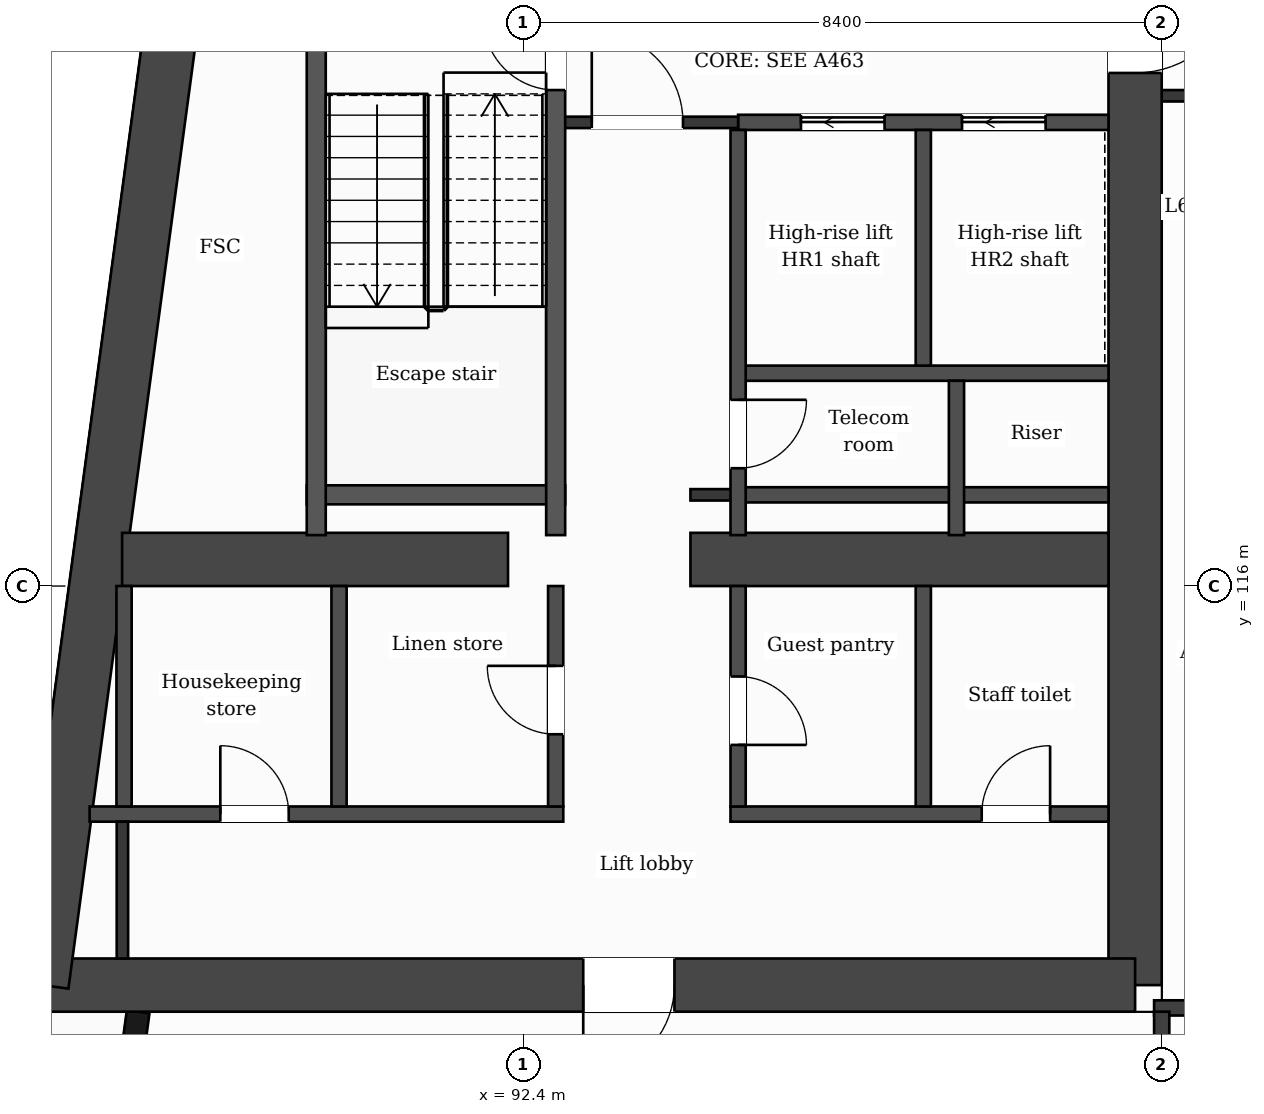
"""IFC4 building model, lengths in metres.
Left out: names, types, materials, properties, quantities, classifications, styles, units other than length and angle.
Written with IfcOpenShell. Run it as: python <this file> out.ifc"""

import sys

from ifc_helpers import new_model, si_unit, direction, frame, frame_2d, origin, place, context, subcontext, project, spatial, rectangle, extrude, element, fill, save


model = new_model("IFC4")
c1 = context("Model", 3, precision=1e-05, world=origin(), true_north=direction((0.0, 1.0)))
c2 = subcontext(c1, "Body", "Model", "MODEL_VIEW")
j1 = project(units=[si_unit("LENGTHUNIT", "METRE"), si_unit("PLANEANGLEUNIT", "RADIAN")], contexts=[c1])
p1 = place(None, origin())
s1 = spatial("IfcSite", under=j1, at=p1, CompositionType="ELEMENT")
p2 = place(p1, origin())
s2 = spatial("IfcBuilding", under=s1, at=p2, CompositionType="ELEMENT")
p3 = place(p2, frame((0.0, 0.0, 259.0)))
s3 = spatial("IfcBuildingStorey", under=s2, at=p3, CompositionType="ELEMENT", Elevation=259.0)
p4 = place(p3, frame((100.45, 132.05, 0.0), z_axis=(0.0, 0.0, 1.0), x_axis=(0.0, -1.0, 0.0)))
e1 = element("IfcWall", 1, at=p4, inside=s3, PredefinedType="SHEAR", context=c2, shape_type="SweptSolid", body=[
    extrude(rectangle(XDim=21.3, YDim=0.7, at=frame_2d((10.65, 0.0))), origin(), (0.0, 0.0, 1.0), 3.7),
])
p5 = place(p4, frame((7.9, 0.0, 0.0)))
e2 = element("IfcOpeningElement", 2, at=p5, cuts=e1, PredefinedType="OPENING", context=c2, shape_type="SweptSolid", body=[
    extrude(rectangle(XDim=1.4, YDim=2.1, at=frame_2d((0.7, 1.05))), frame((0.0, 0.36, 0.0), z_axis=(0.0, -1.0, 0.0), x_axis=(1.0, 0.0, 0.0)), (0.0, 0.0, 1.0), 0.72),
])
p6 = place(p3, frame((100.45, 110.75, 0.0), z_axis=(0.0, 0.0, 1.0), x_axis=(-1.0, 0.0, 0.0)))
e3 = element("IfcWall", 3, at=p6, inside=s3, PredefinedType="SHEAR", context=c2, shape_type="SweptSolid", body=[
    extrude(rectangle(XDim=14.38, YDim=0.7, at=frame_2d((7.19, 0.0))), origin(), (0.0, 0.0, 1.0), 3.7),
])
p7 = place(p6, frame((6.06, 0.0, 0.0)))
e4 = element("IfcOpeningElement", 4, at=p7, cuts=e3, PredefinedType="OPENING", context=c2, shape_type="SweptSolid", body=[
    extrude(rectangle(XDim=1.2, YDim=2.1, at=frame_2d((0.6, 1.05))), frame((0.0, 0.36, 0.0), z_axis=(0.0, -1.0, 0.0), x_axis=(1.0, 0.0, 0.0)), (0.0, 0.0, 1.0), 0.72),
])
p8 = place(p3, frame((86.07, 110.75, 0.0), z_axis=(0.0, 0.0, 1.0), x_axis=(0.133406218907, 0.991061441464, 0.0)))
e5 = element("IfcWall", 5, at=p8, inside=s3, PredefinedType="SHEAR", context=c2, shape_type="SweptSolid", body=[
    extrude(rectangle(XDim=21.492, YDim=0.7, at=frame_2d((10.746, 0.0))), origin(), (0.0, 0.0, 1.0), 3.7),
])
p9 = place(p3, frame((87.123, 116.35, 0.0), z_axis=(0.0, 0.0, 1.0), x_axis=(1.0, 0.0, 0.0)))
e6 = element("IfcWall", 6, at=p9, inside=s3, PredefinedType="SHEAR", context=c2, shape_type="SweptSolid", body=[
    extrude(rectangle(XDim=5.077, YDim=0.7, at=frame_2d((2.539, 0.0))), origin(), (0.0, 0.0, 1.0), 3.7),
])
p10 = place(p3, frame((94.6, 116.35, 0.0), z_axis=(0.0, 0.0, 1.0), x_axis=(1.0, 0.0, 0.0)))
e7 = element("IfcWall", 7, at=p10, inside=s3, PredefinedType="SHEAR", context=c2, shape_type="SweptSolid", body=[
    extrude(rectangle(XDim=5.5, YDim=0.7, at=frame_2d((2.75, 0.0))), origin(), (0.0, 0.0, 1.0), 3.7),
])
p11 = place(p3, frame((87.334, 110.4, 0.0), z_axis=(0.0, 0.0, 1.0), x_axis=(-0.13345962011, -0.991054251694, 0.0)))
e8 = element("IfcWall", 8, at=p11, inside=s3, PredefinedType="SOLIDWALL", context=c2, shape_type="SweptSolid", body=[
    extrude(rectangle(XDim=1.937, YDim=0.3, at=frame_2d((0.969, 0.0))), origin(), (0.0, 0.0, 1.0), 3.38),
])
p12 = place(p3, frame((100.7, 110.45, 0.0), z_axis=(0.0, 0.0, 1.0), x_axis=(1.0, 0.0, 0.0)))
e9 = element("IfcWall", 9, at=p12, inside=s3, PredefinedType="PARTITIONING", context=c2, shape_type="SweptSolid", body=[
    extrude(rectangle(XDim=25.4, YDim=0.2, at=frame_2d((12.7, 0.0))), origin(), (0.0, 0.0, 1.0), 3.38),
])
p13 = place(p3, frame((86.696, 113.0, 0.0), z_axis=(0.0, 0.0, 1.0), x_axis=(1.0, 0.0, 0.0)))
e10 = element("IfcWall", 10, at=p13, inside=s3, PredefinedType="PARTITIONING", context=c2, shape_type="SweptSolid", body=[
    extrude(rectangle(XDim=6.231, YDim=0.2, at=frame_2d((3.116, 0.0))), origin(), (0.0, 0.0, 1.0), 3.38),
])
p14 = place(p13, frame((1.719, 0.0, 0.0)))
e11 = element("IfcOpeningElement", 11, at=p14, cuts=e10, PredefinedType="OPENING", context=c2, shape_type="SweptSolid", body=[
    extrude(rectangle(XDim=0.9, YDim=2.1, at=frame_2d((0.45, 1.05))), frame((0.0, 0.11, 0.0), z_axis=(0.0, -1.0, 0.0), x_axis=(1.0, 0.0, 0.0)), (0.0, 0.0, 1.0), 0.22),
])
p15 = place(p3, frame((95.127, 113.0, 0.0), z_axis=(0.0, 0.0, 1.0), x_axis=(1.0, 0.0, 0.0)))
e12 = element("IfcWall", 12, at=p15, inside=s3, PredefinedType="PARTITIONING", context=c2, shape_type="SweptSolid", body=[
    extrude(rectangle(XDim=4.973, YDim=0.2, at=frame_2d((2.487, 0.0))), origin(), (0.0, 0.0, 1.0), 3.38),
])
p16 = place(p15, frame((3.305, 0.0, 0.0)))
e13 = element("IfcOpeningElement", 13, at=p16, cuts=e12, PredefinedType="OPENING", context=c2, shape_type="SweptSolid", body=[
    extrude(rectangle(XDim=0.9, YDim=2.1, at=frame_2d((0.45, 1.05))), frame((0.0, 0.11, 0.0), z_axis=(0.0, -1.0, 0.0), x_axis=(1.0, 0.0, 0.0)), (0.0, 0.0, 1.0), 0.22),
])
p17 = place(p3, frame((95.227, 117.2, 0.0), z_axis=(0.0, 0.0, 1.0), x_axis=(1.0, 0.0, 0.0)))
e14 = element("IfcWall", 14, at=p17, inside=s3, PredefinedType="PARTITIONING", context=c2, shape_type="SweptSolid", body=[
    extrude(rectangle(XDim=4.873, YDim=0.2, at=frame_2d((2.437, 0.0))), origin(), (0.0, 0.0, 1.0), 3.38),
])
p18 = place(p3, frame((94.6, 117.2, 0.0), z_axis=(0.0, 0.0, 1.0), x_axis=(1.0, 0.0, 0.0)))
e15 = element("IfcWall", 15, at=p18, inside=s3, PredefinedType="PARTITIONING", context=c2, shape_type="SweptSolid", body=[
    extrude(rectangle(XDim=0.627, YDim=0.15, at=frame_2d((0.313, 0.0))), origin(), (0.0, 0.0, 1.0), 3.38),
])
p19 = place(p3, frame((89.552, 117.2, 0.0), z_axis=(0.0, 0.0, 1.0), x_axis=(1.0, 0.0, 0.0)))
e16 = element("IfcWall", 16, at=p19, inside=s3, PredefinedType="PARTITIONING", context=c2, shape_type="SweptSolid", body=[
    extrude(rectangle(XDim=3.4, YDim=0.25, at=frame_2d((1.7, 0.0))), origin(), (0.0, 0.0, 1.0), 3.38),
])
p20 = place(p3, frame((95.227, 118.8, 0.0), z_axis=(0.0, 0.0, 1.0), x_axis=(1.0, 0.0, 0.0)))
e17 = element("IfcWall", 17, at=p20, inside=s3, PredefinedType="PARTITIONING", context=c2, shape_type="SweptSolid", body=[
    extrude(rectangle(XDim=4.873, YDim=0.2, at=frame_2d((2.437, 0.0))), origin(), (0.0, 0.0, 1.0), 3.38),
])
p21 = place(p3, frame((95.227, 122.1, 0.0), z_axis=(0.0, 0.0, 1.0), x_axis=(1.0, 0.0, 0.0)))
e18 = element("IfcWall", 18, at=p21, inside=s3, PredefinedType="PARTITIONING", context=c2, shape_type="SweptSolid", body=[
    extrude(rectangle(XDim=4.873, YDim=0.2, at=frame_2d((2.437, 0.0))), origin(), (0.0, 0.0, 1.0), 3.38),
])
p22 = place(p21, frame((0.827, 0.0, 0.0)))
e19 = element("IfcOpeningElement", 19, at=p22, cuts=e18, PredefinedType="OPENING", context=c2, shape_type="SweptSolid", body=[
    extrude(rectangle(XDim=1.1, YDim=2.1, at=frame_2d((0.55, 1.05))), frame((0.0, 0.11, 0.0), z_axis=(0.0, -1.0, 0.0), x_axis=(1.0, 0.0, 0.0)), (0.0, 0.0, 1.0), 0.22),
])
p23 = place(p21, frame((2.946, 0.0, 0.0)))
e20 = element("IfcOpeningElement", 20, at=p23, cuts=e18, PredefinedType="OPENING", context=c2, shape_type="SweptSolid", body=[
    extrude(rectangle(XDim=1.1, YDim=2.1, at=frame_2d((0.55, 1.05))), frame((0.0, 0.11, 0.0), z_axis=(0.0, -1.0, 0.0), x_axis=(1.0, 0.0, 0.0)), (0.0, 0.0, 1.0), 0.22),
])
p24 = place(p3, frame((92.827, 122.1, 0.0), z_axis=(0.0, 0.0, 1.0), x_axis=(1.0, 0.0, 0.0)))
e21 = element("IfcWall", 21, at=p24, inside=s3, PredefinedType="PARTITIONING", context=c2, shape_type="SweptSolid", body=[
    extrude(rectangle(XDim=2.4, YDim=0.15, at=frame_2d((1.2, 0.0))), origin(), (0.0, 0.0, 1.0), 3.38),
])
p25 = place(p24, frame((0.475, 0.0, 0.0)))
e22 = element("IfcOpeningElement", 22, at=p25, cuts=e21, PredefinedType="OPENING", context=c2, shape_type="SweptSolid", body=[
    extrude(rectangle(XDim=1.2, YDim=2.1, at=frame_2d((0.6, 1.05))), frame((0.0, 0.085, 0.0), z_axis=(0.0, -1.0, 0.0), x_axis=(1.0, 0.0, 0.0)), (0.0, 0.0, 1.0), 0.17),
])
p26 = place(p3, frame((100.8, 122.45, 0.0), z_axis=(0.0, 0.0, 1.0), x_axis=(1.0, 0.0, 0.0)))
e23 = element("IfcWall", 23, at=p26, inside=s3, PredefinedType="PARTITIONING", context=c2, shape_type="SweptSolid", body=[
    extrude(rectangle(XDim=25.2, YDim=0.15, at=frame_2d((12.6, 0.0))), origin(), (0.0, 0.0, 1.0), 3.38),
])
p27 = place(p26, frame((0.63, 0.0, 0.0)))
e24 = element("IfcOpeningElement", 24, at=p27, cuts=e23, PredefinedType="OPENING", context=c2, shape_type="SweptSolid", body=[
    extrude(rectangle(XDim=1.0, YDim=2.1, at=frame_2d((0.5, 1.05))), frame((0.0, 0.085, 0.0), z_axis=(0.0, -1.0, 0.0), x_axis=(1.0, 0.0, 0.0)), (0.0, 0.0, 1.0), 0.17),
])
p28 = place(p26, frame((6.875, 0.0, 0.0)))
e25 = element("IfcOpeningElement", 25, at=p28, cuts=e23, PredefinedType="OPENING", context=c2, shape_type="SweptSolid", body=[
    extrude(rectangle(XDim=0.95, YDim=2.1, at=frame_2d((0.475, 1.05))), frame((0.0, 0.085, 0.0), z_axis=(0.0, -1.0, 0.0), x_axis=(1.0, 0.0, 0.0)), (0.0, 0.0, 1.0), 0.17),
])
p29 = place(p26, frame((8.925, 0.0, 0.0)))
e26 = element("IfcOpeningElement", 26, at=p29, cuts=e23, PredefinedType="OPENING", context=c2, shape_type="SweptSolid", body=[
    extrude(rectangle(XDim=1.0, YDim=2.1, at=frame_2d((0.5, 1.05))), frame((0.0, 0.085, 0.0), z_axis=(0.0, -1.0, 0.0), x_axis=(1.0, 0.0, 0.0)), (0.0, 0.0, 1.0), 0.17),
])
p30 = place(p26, frame((20.5, 0.0, 0.0)))
e27 = element("IfcOpeningElement", 27, at=p30, cuts=e23, PredefinedType="OPENING", context=c2, shape_type="SweptSolid", body=[
    extrude(rectangle(XDim=1.0, YDim=2.1, at=frame_2d((0.5, 1.05))), frame((0.0, 0.085, 0.0), z_axis=(0.0, -1.0, 0.0), x_axis=(1.0, 0.0, 0.0)), (0.0, 0.0, 1.0), 0.17),
])
p31 = place(p3, frame((87.148, 113.1, 0.0), z_axis=(0.0, 0.0, 1.0), x_axis=(0.0, 1.0, 0.0)))
e28 = element("IfcWall", 28, at=p31, inside=s3, PredefinedType="PARTITIONING", context=c2, shape_type="SweptSolid", body=[
    extrude(rectangle(XDim=2.9, YDim=0.2, at=frame_2d((1.45, 0.0))), origin(), (0.0, 0.0, 1.0), 3.38),
])
p32 = place(p3, frame((87.127, 111.1, 0.0), z_axis=(0.0, 0.0, 1.0), x_axis=(0.0, 1.0, 0.0)))
e29 = element("IfcWall", 29, at=p32, inside=s3, PredefinedType="PARTITIONING", context=c2, shape_type="SweptSolid", body=[
    extrude(rectangle(XDim=1.8, YDim=0.15, at=frame_2d((0.9, 0.0))), origin(), (0.0, 0.0, 1.0), 3.38),
])
p33 = place(p3, frame((89.677, 116.67, 0.0), z_axis=(0.0, 0.0, 1.0), x_axis=(0.0, 1.0, 0.0)))
e30 = element("IfcWall", 30, at=p33, inside=s3, PredefinedType="PARTITIONING", context=c2, shape_type="SweptSolid", body=[
    extrude(rectangle(XDim=7.155, YDim=0.25, at=frame_2d((3.578, 0.0))), origin(), (0.0, 0.0, 1.0), 3.38),
])
p34 = place(p3, frame((89.977, 113.1, 0.0), z_axis=(0.0, 0.0, 1.0), x_axis=(0.0, 1.0, 0.0)))
e31 = element("IfcWall", 31, at=p34, inside=s3, PredefinedType="PARTITIONING", context=c2, shape_type="SweptSolid", body=[
    extrude(rectangle(XDim=2.9, YDim=0.2, at=frame_2d((1.45, 0.0))), origin(), (0.0, 0.0, 1.0), 3.38),
])
p35 = place(p3, frame((92.827, 113.1, 0.0), z_axis=(0.0, 0.0, 1.0), x_axis=(0.0, 1.0, 0.0)))
e32 = element("IfcWall", 32, at=p35, inside=s3, PredefinedType="PARTITIONING", context=c2, shape_type="SweptSolid", body=[
    extrude(rectangle(XDim=2.9, YDim=0.2, at=frame_2d((1.45, 0.0))), origin(), (0.0, 0.0, 1.0), 3.38),
])
p36 = place(p35, frame((0.95, 0.0, 0.0)))
e33 = element("IfcOpeningElement", 33, at=p36, cuts=e32, PredefinedType="OPENING", context=c2, shape_type="SweptSolid", body=[
    extrude(rectangle(XDim=0.9, YDim=2.1, at=frame_2d((0.45, 1.05))), frame((0.0, 0.11, 0.0), z_axis=(0.0, -1.0, 0.0), x_axis=(1.0, 0.0, 0.0)), (0.0, 0.0, 1.0), 0.22),
])
p37 = place(p3, frame((92.827, 116.67, 0.0), z_axis=(0.0, 0.0, 1.0), x_axis=(0.0, 1.0, 0.0)))
e34 = element("IfcWall", 34, at=p37, inside=s3, PredefinedType="PARTITIONING", context=c2, shape_type="SweptSolid", body=[
    extrude(rectangle(XDim=7.155, YDim=0.25, at=frame_2d((3.578, 0.0))), origin(), (0.0, 0.0, 1.0), 3.38),
])
p38 = place(p37, frame((5.855, 0.0, 0.0)))
e35 = element("IfcOpeningElement", 35, at=p38, cuts=e34, PredefinedType="OPENING", context=c2, shape_type="SweptSolid", body=[
    extrude(rectangle(XDim=0.95, YDim=2.1, at=frame_2d((0.475, 1.05))), frame((0.0, 0.135, 0.0), z_axis=(0.0, -1.0, 0.0), x_axis=(1.0, 0.0, 0.0)), (0.0, 0.0, 1.0), 0.27),
])
p39 = place(p3, frame((95.227, 113.1, 0.0), z_axis=(0.0, 0.0, 1.0), x_axis=(0.0, 1.0, 0.0)))
e36 = element("IfcWall", 36, at=p39, inside=s3, PredefinedType="PARTITIONING", context=c2, shape_type="SweptSolid", body=[
    extrude(rectangle(XDim=2.9, YDim=0.2, at=frame_2d((1.45, 0.0))), origin(), (0.0, 0.0, 1.0), 3.38),
])
p40 = place(p39, frame((0.81, 0.0, 0.0)))
e37 = element("IfcOpeningElement", 37, at=p40, cuts=e36, PredefinedType="OPENING", context=c2, shape_type="SweptSolid", body=[
    extrude(rectangle(XDim=0.9, YDim=2.1, at=frame_2d((0.45, 1.05))), frame((0.0, 0.11, 0.0), z_axis=(0.0, -1.0, 0.0), x_axis=(1.0, 0.0, 0.0)), (0.0, 0.0, 1.0), 0.22),
])
p41 = place(p3, frame((95.227, 116.67, 0.0), z_axis=(0.0, 0.0, 1.0), x_axis=(0.0, 1.0, 0.0)))
e38 = element("IfcWall", 38, at=p41, inside=s3, PredefinedType="PARTITIONING", context=c2, shape_type="SweptSolid", body=[
    extrude(rectangle(XDim=5.33, YDim=0.2, at=frame_2d((2.665, 0.0))), origin(), (0.0, 0.0, 1.0), 3.38),
])
p42 = place(p41, frame((0.88, 0.0, 0.0)))
e39 = element("IfcOpeningElement", 39, at=p42, cuts=e38, PredefinedType="OPENING", context=c2, shape_type="SweptSolid", body=[
    extrude(rectangle(XDim=0.9, YDim=2.1, at=frame_2d((0.45, 1.05))), frame((0.0, 0.11, 0.0), z_axis=(0.0, -1.0, 0.0), x_axis=(1.0, 0.0, 0.0)), (0.0, 0.0, 1.0), 0.22),
])
p43 = place(p3, frame((97.664, 113.1, 0.0), z_axis=(0.0, 0.0, 1.0), x_axis=(0.0, 1.0, 0.0)))
e40 = element("IfcWall", 40, at=p43, inside=s3, PredefinedType="PARTITIONING", context=c2, shape_type="SweptSolid", body=[
    extrude(rectangle(XDim=2.9, YDim=0.2, at=frame_2d((1.45, 0.0))), origin(), (0.0, 0.0, 1.0), 3.38),
])
p44 = place(p3, frame((97.664, 118.9, 0.0), z_axis=(0.0, 0.0, 1.0), x_axis=(0.0, 1.0, 0.0)))
e41 = element("IfcWall", 41, at=p44, inside=s3, PredefinedType="PARTITIONING", context=c2, shape_type="SweptSolid", body=[
    extrude(rectangle(XDim=3.1, YDim=0.2, at=frame_2d((1.55, 0.0))), origin(), (0.0, 0.0, 1.0), 3.38),
])
p45 = place(p3, frame((98.1, 116.67, 0.0), z_axis=(0.0, 0.0, 1.0), x_axis=(0.0, 1.0, 0.0)))
e42 = element("IfcWall", 42, at=p45, inside=s3, PredefinedType="PARTITIONING", context=c2, shape_type="SweptSolid", body=[
    extrude(rectangle(XDim=2.03, YDim=0.2, at=frame_2d((1.015, 0.0))), origin(), (0.0, 0.0, 1.0), 3.38),
])
p46 = place(p3, frame((100.8, 108.79, 0.0), z_axis=(0.0, 0.0, 1.0), x_axis=(0.0, 1.0, 0.0)))
e43 = element("IfcWall", 43, at=p46, inside=s3, PredefinedType="PARTITIONING", context=c2, shape_type="SweptSolid", body=[
    extrude(rectangle(XDim=1.61, YDim=0.2, at=frame_2d((0.805, 0.0))), origin(), (0.0, 0.0, 1.0), 3.38),
])
p47 = place(p25, origin())
e44 = element("IfcDoor", 44, at=p47, inside=s3, OperationType="SINGLE_SWING_LEFT", PredefinedType="DOOR", context=c2, shape_type="SweptSolid", body=[
    extrude(rectangle(XDim=1.2, YDim=2.1, at=frame_2d((0.6, 1.05))), frame((0.0, 0.025, 0.0), z_axis=(0.0, -1.0, 0.0), x_axis=(1.0, 0.0, 0.0)), (0.0, 0.0, 1.0), 0.05),
])
fill(e22, e44)
p48 = place(p22, origin())
e45 = element("IfcDoor", 45, at=p48, inside=s3, OperationType="SLIDING_TO_LEFT", PredefinedType="DOOR", context=c2, shape_type="SweptSolid", body=[
    extrude(rectangle(XDim=1.1, YDim=2.1, at=frame_2d((0.55, 1.05))), frame((0.0, 0.025, 0.0), z_axis=(0.0, -1.0, 0.0), x_axis=(1.0, 0.0, 0.0)), (0.0, 0.0, 1.0), 0.05),
])
fill(e19, e45)
p49 = place(p23, origin())
e46 = element("IfcDoor", 46, at=p49, inside=s3, OperationType="SLIDING_TO_LEFT", PredefinedType="DOOR", context=c2, shape_type="SweptSolid", body=[
    extrude(rectangle(XDim=1.1, YDim=2.1, at=frame_2d((0.55, 1.05))), frame((0.0, 0.025, 0.0), z_axis=(0.0, -1.0, 0.0), x_axis=(1.0, 0.0, 0.0)), (0.0, 0.0, 1.0), 0.05),
])
fill(e20, e46)
p50 = place(p38, origin())
e47 = element("IfcDoor", 47, at=p50, inside=s3, OperationType="SINGLE_SWING_RIGHT", PredefinedType="DOOR", context=c2, shape_type="SweptSolid", body=[
    extrude(rectangle(XDim=0.95, YDim=2.1, at=frame_2d((0.475, 1.05))), frame((0.0, 0.025, 0.0), z_axis=(0.0, -1.0, 0.0), x_axis=(1.0, 0.0, 0.0)), (0.0, 0.0, 1.0), 0.05),
])
fill(e35, e47)
p51 = place(p42, origin())
e48 = element("IfcDoor", 48, at=p51, inside=s3, OperationType="SINGLE_SWING_RIGHT", PredefinedType="DOOR", context=c2, shape_type="SweptSolid", body=[
    extrude(rectangle(XDim=0.9, YDim=2.1, at=frame_2d((0.45, 1.05))), frame((0.0, 0.025, 0.0), z_axis=(0.0, -1.0, 0.0), x_axis=(1.0, 0.0, 0.0)), (0.0, 0.0, 1.0), 0.05),
])
fill(e39, e48)
p52 = place(p14, origin())
e49 = element("IfcDoor", 49, at=p52, inside=s3, OperationType="SINGLE_SWING_LEFT", PredefinedType="DOOR", context=c2, shape_type="SweptSolid", body=[
    extrude(rectangle(XDim=0.9, YDim=2.1, at=frame_2d((0.45, 1.05))), frame((0.0, 0.025, 0.0), z_axis=(0.0, -1.0, 0.0), x_axis=(1.0, 0.0, 0.0)), (0.0, 0.0, 1.0), 0.05),
])
fill(e11, e49)
p53 = place(p36, origin())
e50 = element("IfcDoor", 50, at=p53, inside=s3, OperationType="SINGLE_SWING_RIGHT", PredefinedType="DOOR", context=c2, shape_type="SweptSolid", body=[
    extrude(rectangle(XDim=0.9, YDim=2.1, at=frame_2d((0.45, 1.05))), frame((0.0, 0.025, 0.0), z_axis=(0.0, -1.0, 0.0), x_axis=(1.0, 0.0, 0.0)), (0.0, 0.0, 1.0), 0.05),
])
fill(e33, e50)
p54 = place(p40, origin())
e51 = element("IfcDoor", 51, at=p54, inside=s3, OperationType="SINGLE_SWING_LEFT", PredefinedType="DOOR", context=c2, shape_type="SweptSolid", body=[
    extrude(rectangle(XDim=0.9, YDim=2.1, at=frame_2d((0.45, 1.05))), frame((0.0, 0.025, 0.0), z_axis=(0.0, -1.0, 0.0), x_axis=(1.0, 0.0, 0.0)), (0.0, 0.0, 1.0), 0.05),
])
fill(e37, e51)
p55 = place(p16, origin())
e52 = element("IfcDoor", 52, at=p55, inside=s3, OperationType="SINGLE_SWING_RIGHT", PredefinedType="DOOR", context=c2, shape_type="SweptSolid", body=[
    extrude(rectangle(XDim=0.9, YDim=2.1, at=frame_2d((0.45, 1.05))), frame((0.0, 0.025, 0.0), z_axis=(0.0, -1.0, 0.0), x_axis=(1.0, 0.0, 0.0)), (0.0, 0.0, 1.0), 0.05),
])
fill(e13, e52)
p56 = place(p7, origin())
e53 = element("IfcDoor", 53, at=p56, inside=s3, OperationType="SINGLE_SWING_RIGHT", PredefinedType="DOOR", context=c2, shape_type="SweptSolid", body=[
    extrude(rectangle(XDim=1.2, YDim=2.1, at=frame_2d((0.6, 1.05))), frame((0.0, 0.025, 0.0), z_axis=(0.0, -1.0, 0.0), x_axis=(1.0, 0.0, 0.0)), (0.0, 0.0, 1.0), 0.05),
])
fill(e4, e53)
p57 = place(p5, origin())
e54 = element("IfcDoor", 54, at=p57, inside=s3, OperationType="SINGLE_SWING_LEFT", PredefinedType="DOOR", context=c2, shape_type="SweptSolid", body=[
    extrude(rectangle(XDim=1.4, YDim=2.1, at=frame_2d((0.7, 1.05))), frame((0.0, 0.025, 0.0), z_axis=(0.0, -1.0, 0.0), x_axis=(1.0, 0.0, 0.0)), (0.0, 0.0, 1.0), 0.05),
])
fill(e2, e54)
save(model, sys.argv[1])
